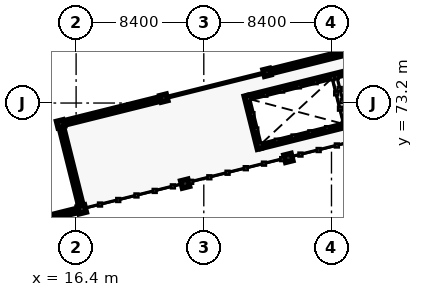
"""IFC4 building model, lengths in metres.
Left out: names, types, materials, properties, quantities, classifications, styles, units other than length and angle.
Written with IfcOpenShell. Run it as: python <this file> out.ifc"""

import sys

from ifc_helpers import new_model, si_unit, direction, frame, frame_2d, origin, origin_2d, place, context, subcontext, project, spatial, rectangle, extrude, element, fill, save


model = new_model("IFC4")
c1 = context("Model", 3, precision=1e-05, world=origin(), true_north=direction((0.0, 1.0)))
c2 = subcontext(c1, "Body", "Model", "MODEL_VIEW")
j1 = project(units=[si_unit("LENGTHUNIT", "METRE"), si_unit("PLANEANGLEUNIT", "RADIAN")], contexts=[c1])
p1 = place(None, origin())
s1 = spatial("IfcSite", under=j1, at=p1, CompositionType="ELEMENT")
p2 = place(p1, origin())
s2 = spatial("IfcBuilding", under=s1, at=p2, CompositionType="ELEMENT")
p3 = place(p2, frame((0.0, 0.0, 9.0)))
s3 = spatial("IfcBuildingStorey", under=s2, at=p3, CompositionType="ELEMENT", Elevation=9.0)
for number, where, z_axis, x_axis in (
    (1, (16.779, 66.204, 0.0), (0.0, 0.0, 1.0), (0.97, 0.242, 0.0)),
    (2, (23.572, 67.898, 0.0), (0.0, 0.0, 1.0), (0.97, 0.242, 0.0)),
    (3, (30.364, 69.591, 0.0), (0.0, 0.0, 1.0), (0.97, 0.242, 0.0)),
):
    element("IfcColumn", number, at=place(p3, frame(where, z_axis=z_axis, x_axis=x_axis)), inside=s3, PredefinedType="COLUMN", context=c2, shape_type="SweptSolid", body=[
        extrude(rectangle(XDim=0.5, YDim=0.5, at=origin_2d()), origin(), (0.0, 0.0, 1.0), 3.9),
    ])
for number, where, z_axis, x_axis in (
    (4, (15.376, 71.832, 0.0), (0.0, 0.0, 1.0), (0.97, 0.242, 0.0)),
    (5, (22.168, 73.525, 0.0), (0.0, 0.0, 1.0), (0.97, 0.242, 0.0)),
    (6, (28.96, 75.219, 0.0), (0.0, 0.0, 1.0), (0.97, 0.242, 0.0)),
):
    element("IfcColumn", number, at=place(p3, frame(where, z_axis=z_axis, x_axis=x_axis)), inside=s3, PredefinedType="COLUMN", context=c2, shape_type="SweptSolid", body=[
        extrude(rectangle(XDim=0.45, YDim=0.45, at=origin_2d()), origin(), (0.0, 0.0, 1.0), 3.9),
    ])
p4 = place(p3, frame((10.065, 64.53, 0.0), z_axis=(0.0, 0.0, 1.0), x_axis=(0.97027883487, 0.241989633258, 0.0)))
e7 = element("IfcWall", 7, at=p4, inside=s3, PredefinedType="SOLIDWALL", context=c2, shape_type="SweptSolid", body=[
    extrude(rectangle(XDim=6.839, YDim=0.3, at=frame_2d((3.42, 0.0))), origin(), (0.0, 0.0, 1.0), 3.45),
])
p5 = place(p4, frame((2.67, 0.0, 0.9)))
e8 = element("IfcOpeningElement", 8, at=p5, cuts=e7, PredefinedType="OPENING", context=c2, shape_type="SweptSolid", body=[
    extrude(rectangle(XDim=1.5, YDim=1.5, at=frame_2d((0.75, 0.75))), frame((0.0, 0.16, 0.0), z_axis=(0.0, -1.0, 0.0), x_axis=(1.0, 0.0, 0.0)), (0.0, 0.0, 1.0), 0.32),
])
p6 = place(p3, frame((16.76, 66.282, 0.0), z_axis=(0.0, 0.0, 1.0), x_axis=(-0.242036480393, 0.970267149892, 0.0)))
e9 = element("IfcWall", 9, at=p6, inside=s3, PredefinedType="SOLIDWALL", context=c2, shape_type="SweptSolid", body=[
    extrude(rectangle(XDim=5.64, YDim=0.3, at=frame_2d((2.82, 0.0))), origin(), (0.0, 0.0, 1.0), 3.45),
])
p7 = place(p6, frame((2.07, 0.0, 0.9)))
e10 = element("IfcOpeningElement", 10, at=p7, cuts=e9, PredefinedType="OPENING", context=c2, shape_type="SweptSolid", body=[
    extrude(rectangle(XDim=1.5, YDim=1.5, at=frame_2d((0.75, 0.75))), frame((0.0, 0.16, 0.0), z_axis=(0.0, -1.0, 0.0), x_axis=(1.0, 0.0, 0.0)), (0.0, 0.0, 1.0), 0.32),
])
p8 = place(p3, frame((15.473, 71.856, 0.0), z_axis=(0.0, 0.0, 1.0), x_axis=(0.970298579828, 0.24191045034, 0.0)))
e11 = element("IfcWall", 11, at=p8, inside=s3, PredefinedType="SOLIDWALL", context=c2, shape_type="SweptSolid", body=[
    extrude(rectangle(XDim=6.8, YDim=0.3, at=frame_2d((3.4, 0.0))), origin(), (0.0, 0.0, 1.0), 3.135),
])
p9 = place(p8, frame((2.5, 0.0, 0.9)))
e12 = element("IfcOpeningElement", 12, at=p9, cuts=e11, PredefinedType="OPENING", context=c2, shape_type="SweptSolid", body=[
    extrude(rectangle(XDim=1.8, YDim=1.5, at=frame_2d((0.9, 0.75))), frame((0.0, 0.16, 0.0), z_axis=(0.0, -1.0, 0.0), x_axis=(1.0, 0.0, 0.0)), (0.0, 0.0, 1.0), 0.32),
])
p10 = place(p3, frame((29.058, 75.243, 0.0), z_axis=(0.0, 0.0, 1.0), x_axis=(0.970296478685, 0.241918877831, 0.0)))
e13 = element("IfcWall", 13, at=p10, inside=s3, PredefinedType="SOLIDWALL", context=c2, shape_type="SweptSolid", body=[
    extrude(rectangle(XDim=6.8, YDim=0.3, at=frame_2d((3.4, 0.0))), origin(), (0.0, 0.0, 1.0), 3.135),
])
p11 = place(p10, frame((2.5, 0.0, 0.9)))
e14 = element("IfcOpeningElement", 14, at=p11, cuts=e13, PredefinedType="OPENING", context=c2, shape_type="SweptSolid", body=[
    extrude(rectangle(XDim=1.8, YDim=1.5, at=frame_2d((0.9, 0.75))), frame((0.0, 0.16, 0.0), z_axis=(0.0, -1.0, 0.0), x_axis=(1.0, 0.0, 0.0)), (0.0, 0.0, 1.0), 0.32),
])
p12 = place(p3, frame((28.444, 70.18, 0.0), z_axis=(0.0, 0.0, 1.0), x_axis=(-0.241898912952, 0.970301456204, 0.0)))
e15 = element("IfcWall", 15, at=p12, inside=s3, PredefinedType="SHEAR", context=c2, shape_type="SweptSolid", body=[
    extrude(rectangle(XDim=3.609, YDim=0.25, at=frame_2d((1.805, 0.0))), origin(), (0.0, 0.0, 1.0), 3.66),
])
p13 = place(p3, frame((35.706, 72.119, 0.0), z_axis=(0.0, 0.0, 1.0), x_axis=(-0.970299691856, -0.241905989972, 0.0)))
e16 = element("IfcWall", 16, at=p13, inside=s3, PredefinedType="SHEAR", context=c2, shape_type="SweptSolid", body=[
    extrude(rectangle(XDim=7.391, YDim=0.25, at=frame_2d((3.695, 0.0))), origin(), (0.0, 0.0, 1.0), 3.66),
])
p14 = place(p3, frame((27.723, 73.591, 0.0), z_axis=(0.0, 0.0, 1.0), x_axis=(0.970291958031, 0.241937008705, 0.0)))
e17 = element("IfcWall", 17, at=p14, inside=s3, PredefinedType="SHEAR", context=c2, shape_type="SweptSolid", body=[
    extrude(rectangle(XDim=7.39, YDim=0.25, at=frame_2d((3.695, 0.0))), origin(), (0.0, 0.0, 1.0), 3.66),
])
p15 = place(p7, origin())
e18 = element("IfcWindow", 18, at=p15, inside=s3, PartitioningType="SINGLE_PANEL", PredefinedType="WINDOW", context=c2, shape_type="SweptSolid", body=[
    extrude(rectangle(XDim=1.5, YDim=1.5, at=frame_2d((0.75, 0.75))), frame((0.0, 0.03, 0.0), z_axis=(0.0, -1.0, 0.0), x_axis=(1.0, 0.0, 0.0)), (0.0, 0.0, 1.0), 0.06),
])
fill(e10, e18)
p16 = place(p9, origin())
e19 = element("IfcWindow", 19, at=p16, inside=s3, PartitioningType="SINGLE_PANEL", PredefinedType="WINDOW", context=c2, shape_type="SweptSolid", body=[
    extrude(rectangle(XDim=1.8, YDim=1.5, at=frame_2d((0.9, 0.75))), frame((0.0, 0.03, 0.0), z_axis=(0.0, -1.0, 0.0), x_axis=(1.0, 0.0, 0.0)), (0.0, 0.0, 1.0), 0.06),
])
fill(e12, e19)
p17 = place(p11, origin())
e20 = element("IfcWindow", 20, at=p17, inside=s3, PartitioningType="SINGLE_PANEL", PredefinedType="WINDOW", context=c2, shape_type="SweptSolid", body=[
    extrude(rectangle(XDim=1.8, YDim=1.5, at=frame_2d((0.9, 0.75))), frame((0.0, 0.03, 0.0), z_axis=(0.0, -1.0, 0.0), x_axis=(1.0, 0.0, 0.0)), (0.0, 0.0, 1.0), 0.06),
])
fill(e14, e20)
save(model, sys.argv[1])
